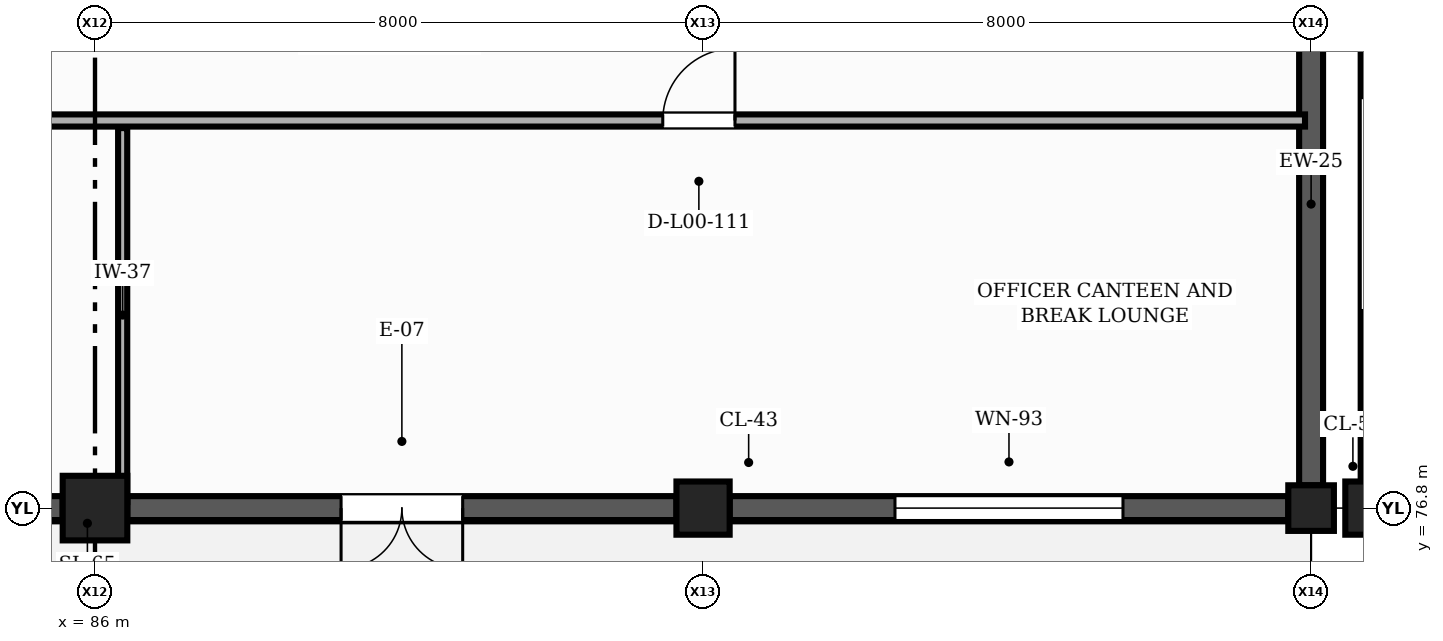
"""IFC4 building model, lengths in metres.
Left out: names, types, materials, properties, quantities, classifications, styles, units other than length and angle.
Written with IfcOpenShell. Run it as: python <this file> out.ifc"""

import sys

from ifc_helpers import new_model, si_unit, direction, frame, frame_2d, origin, origin_2d, place, context, subcontext, project, spatial, rectangle, extrude, element, fill, save


model = new_model("IFC4")
c1 = context("Model", 3, precision=1e-05, world=origin(), true_north=direction((0.0, 1.0)))
c2 = subcontext(c1, "Body", "Model", "MODEL_VIEW")
j1 = project(units=[si_unit("LENGTHUNIT", "METRE"), si_unit("PLANEANGLEUNIT", "RADIAN")], contexts=[c1])
p1 = place(None, origin())
s1 = spatial("IfcSite", under=j1, at=p1, CompositionType="ELEMENT")
p2 = place(p1, origin())
s2 = spatial("IfcBuilding", under=s1, at=p2, CompositionType="ELEMENT")
p3 = place(p2, origin())
s3 = spatial("IfcBuildingStorey", under=s2, at=p3, CompositionType="ELEMENT", Elevation=0.0)
p4 = place(p3, frame((86.0, 76.8, 0.0), z_axis=(0.0, 0.0, 1.0), x_axis=(1.0, 0.0, 0.0)))
e1 = element("IfcColumn", 1, at=p4, inside=s3, PredefinedType="COLUMN", context=c2, shape_type="SweptSolid", body=[
    extrude(rectangle(XDim=0.85, YDim=0.85, at=origin_2d()), origin(), (0.0, 0.0, 1.0), 4.8),
])
p5 = place(p3, frame((94.0, 76.8, 0.0), z_axis=(0.0, 0.0, 1.0), x_axis=(1.0, 0.0, 0.0)))
e2 = element("IfcColumn", 2, at=p5, inside=s3, PredefinedType="COLUMN", context=c2, shape_type="SweptSolid", body=[
    extrude(rectangle(XDim=0.7, YDim=0.7, at=origin_2d()), origin(), (0.0, 0.0, 1.0), 4.8),
])
p6 = place(p3, frame((102.0, 76.8, 0.0), z_axis=(0.0, 0.0, 1.0), x_axis=(1.0, 0.0, 0.0)))
e3 = element("IfcColumn", 3, at=p6, inside=s3, PredefinedType="COLUMN", context=c2, shape_type="SweptSolid", body=[
    extrude(rectangle(XDim=0.6, YDim=0.6, at=origin_2d()), origin(), (0.0, 0.0, 1.0), 4.8),
])
p7 = place(p3, frame((102.8, 76.8, 0.0), z_axis=(0.0, 0.0, 1.0), x_axis=(1.0, 0.0, 0.0)))
e4 = element("IfcColumn", 4, at=p7, inside=s3, PredefinedType="COLUMN", context=c2, shape_type="SweptSolid", body=[
    extrude(rectangle(XDim=0.7, YDim=0.7, at=origin_2d()), origin(), (0.0, 0.0, 1.0), 4.8),
])
p8 = place(p3, frame((78.425, 76.8, 0.0), z_axis=(0.0, 0.0, 1.0), x_axis=(1.0, 0.0, 0.0)))
e5 = element("IfcWall", 5, at=p8, inside=s3, PredefinedType="SOLIDWALL", context=c2, shape_type="SweptSolid", body=[
    extrude(rectangle(XDim=7.15, YDim=0.315, at=frame_2d((3.575, 0.0))), origin(), (0.0, 0.0, 1.0), 3.78),
])
p9 = place(p8, frame((1.975, 0.0, 0.9)))
e6 = element("IfcOpeningElement", 6, at=p9, cuts=e5, PredefinedType="OPENING", context=c2, shape_type="SweptSolid", body=[
    extrude(rectangle(XDim=3.2, YDim=2.0, at=frame_2d((1.6, 1.0))), frame((0.0, 0.167, 0.0), z_axis=(0.0, -1.0, 0.0), x_axis=(1.0, 0.0, 0.0)), (0.0, 0.0, 1.0), 0.335),
])
p10 = place(p3, frame((86.425, 76.8, 0.0), z_axis=(0.0, 0.0, 1.0), x_axis=(1.0, 0.0, 0.0)))
e7 = element("IfcWall", 7, at=p10, inside=s3, PredefinedType="SOLIDWALL", context=c2, shape_type="SweptSolid", body=[
    extrude(rectangle(XDim=7.225, YDim=0.315, at=frame_2d((3.612, 0.0))), origin(), (0.0, 0.0, 1.0), 3.78),
])
p11 = place(p10, frame((2.812, 0.0, 0.0)))
e8 = element("IfcOpeningElement", 8, at=p11, cuts=e7, PredefinedType="OPENING", context=c2, shape_type="SweptSolid", body=[
    extrude(rectangle(XDim=1.6, YDim=2.25, at=frame_2d((0.8, 1.125))), frame((0.0, 0.167, 0.0), z_axis=(0.0, -1.0, 0.0), x_axis=(1.0, 0.0, 0.0)), (0.0, 0.0, 1.0), 0.335),
])
p12 = place(p3, frame((94.35, 76.8, 0.0), z_axis=(0.0, 0.0, 1.0), x_axis=(1.0, 0.0, 0.0)))
e9 = element("IfcWall", 9, at=p12, inside=s3, PredefinedType="SOLIDWALL", context=c2, shape_type="SweptSolid", body=[
    extrude(rectangle(XDim=7.35, YDim=0.315, at=frame_2d((3.675, 0.0))), origin(), (0.0, 0.0, 1.0), 3.78),
])
p13 = place(p12, frame((2.175, 0.0, 0.9)))
e10 = element("IfcOpeningElement", 10, at=p13, cuts=e9, PredefinedType="OPENING", context=c2, shape_type="SweptSolid", body=[
    extrude(rectangle(XDim=3.0, YDim=1.8, at=frame_2d((1.5, 0.9))), frame((0.0, 0.167, 0.0), z_axis=(0.0, -1.0, 0.0), x_axis=(1.0, 0.0, 0.0)), (0.0, 0.0, 1.0), 0.335),
])
p14 = place(p3, frame((102.0, 77.1, 0.0), z_axis=(0.0, 0.0, 1.0), x_axis=(0.0, 1.0, 0.0)))
e11 = element("IfcWall", 11, at=p14, inside=s3, PredefinedType="SOLIDWALL", context=c2, shape_type="SweptSolid", body=[
    extrude(rectangle(XDim=7.4, YDim=0.315, at=frame_2d((3.7, 0.0))), origin(), (0.0, 0.0, 1.0), 3.88),
])
p15 = place(p3, frame((102.8, 84.45, -0.42), z_axis=(0.0, 0.0, 1.0), x_axis=(0.0, -1.0, 0.0)))
e12 = element("IfcWall", 12, at=p15, inside=s3, PredefinedType="SOLIDWALL", context=c2, shape_type="SweptSolid", body=[
    extrude(rectangle(XDim=7.3, YDim=0.295, at=frame_2d((3.65, 0.0))), origin(), (0.0, 0.0, 1.0), 4.3),
])
p16 = place(p15, frame((2.25, 0.0, 1.32)))
e13 = element("IfcOpeningElement", 13, at=p16, cuts=e12, PredefinedType="OPENING", context=c2, shape_type="SweptSolid", body=[
    extrude(rectangle(XDim=2.8, YDim=1.8, at=frame_2d((1.4, 0.9))), frame((0.0, 0.157, 0.0), z_axis=(0.0, -1.0, 0.0), x_axis=(1.0, 0.0, 0.0)), (0.0, 0.0, 1.0), 0.315),
])
p17 = place(p3, frame((86.364, 76.88, 0.0), z_axis=(0.0, 0.0, 1.0), x_axis=(0.0, 1.0, 0.0)))
e14 = element("IfcWall", 14, at=p17, inside=s3, PredefinedType="PARTITIONING", context=c2, shape_type="SweptSolid", body=[
    extrude(rectangle(XDim=4.92, YDim=0.12, at=frame_2d((2.46, 0.0))), origin(), (0.0, 0.0, 1.0), 4.53),
])
p18 = place(p3, frame((29.3, 81.9, 0.0), z_axis=(0.0, 0.0, 1.0), x_axis=(1.0, 0.0, 0.0)))
e15 = element("IfcWall", 15, at=p18, inside=s3, PredefinedType="PARTITIONING", context=c2, shape_type="SweptSolid", body=[
    extrude(rectangle(XDim=72.62, YDim=0.16, at=frame_2d((36.31, 0.0))), origin(), (0.0, 0.0, 1.0), 3.765),
])
p19 = place(p18, frame((7.68, 0.0, 0.0)))
e16 = element("IfcOpeningElement", 16, at=p19, cuts=e15, PredefinedType="OPENING", context=c2, shape_type="SweptSolid", body=[
    extrude(rectangle(XDim=1.08, YDim=2.14, at=frame_2d((0.54, 1.07))), frame((0.0, 0.09, 0.0), z_axis=(0.0, -1.0, 0.0), x_axis=(1.0, 0.0, 0.0)), (0.0, 0.0, 1.0), 0.18),
])
p20 = place(p18, frame((23.6, 0.0, 0.0)))
e17 = element("IfcOpeningElement", 17, at=p20, cuts=e15, PredefinedType="OPENING", context=c2, shape_type="SweptSolid", body=[
    extrude(rectangle(XDim=1.1, YDim=2.1, at=frame_2d((0.55, 1.05))), frame((0.0, 0.09, 0.0), z_axis=(0.0, -1.0, 0.0), x_axis=(1.0, 0.0, 0.0)), (0.0, 0.0, 1.0), 0.18),
])
p21 = place(p18, frame((36.75, 0.0, 0.0)))
e18 = element("IfcOpeningElement", 18, at=p21, cuts=e15, PredefinedType="OPENING", context=c2, shape_type="SweptSolid", body=[
    extrude(rectangle(XDim=0.9, YDim=2.1, at=frame_2d((0.45, 1.05))), frame((0.0, 0.09, 0.0), z_axis=(0.0, -1.0, 0.0), x_axis=(1.0, 0.0, 0.0)), (0.0, 0.0, 1.0), 0.18),
])
p22 = place(p18, frame((49.34, 0.0, 0.0)))
e19 = element("IfcOpeningElement", 19, at=p22, cuts=e15, PredefinedType="OPENING", context=c2, shape_type="SweptSolid", body=[
    extrude(rectangle(XDim=0.92, YDim=2.1, at=frame_2d((0.46, 1.05))), frame((0.0, 0.09, 0.0), z_axis=(0.0, -1.0, 0.0), x_axis=(1.0, 0.0, 0.0)), (0.0, 0.0, 1.0), 0.18),
])
p23 = place(p18, frame((64.17, 0.0, 0.0)))
e20 = element("IfcOpeningElement", 20, at=p23, cuts=e15, PredefinedType="OPENING", context=c2, shape_type="SweptSolid", body=[
    extrude(rectangle(XDim=0.95, YDim=2.1, at=frame_2d((0.475, 1.05))), frame((0.0, 0.09, 0.0), z_axis=(0.0, -1.0, 0.0), x_axis=(1.0, 0.0, 0.0)), (0.0, 0.0, 1.0), 0.18),
])
p24 = place(p11, frame((1.6, 0.0, 0.0), z_axis=(0.0, 0.0, 1.0), x_axis=(-1.0, 0.0, 0.0)))
e21 = element("IfcDoor", 21, at=p24, inside=s3, OperationType="DOUBLE_DOOR_SINGLE_SWING", PredefinedType="DOOR", context=c2, shape_type="SweptSolid", body=[
    extrude(rectangle(XDim=1.6, YDim=2.25, at=frame_2d((0.8, 1.125))), frame((0.0, 0.025, 0.0), z_axis=(0.0, -1.0, 0.0), x_axis=(1.0, 0.0, 0.0)), (0.0, 0.0, 1.0), 0.05),
])
fill(e8, e21)
p25 = place(p13, origin())
e22 = element("IfcWindow", 22, at=p25, inside=s3, PartitioningType="SINGLE_PANEL", PredefinedType="WINDOW", context=c2, shape_type="SweptSolid", body=[
    extrude(rectangle(XDim=3.0, YDim=1.8, at=frame_2d((1.5, 0.9))), frame((0.0, 0.03, 0.0), z_axis=(0.0, -1.0, 0.0), x_axis=(1.0, 0.0, 0.0)), (0.0, 0.0, 1.0), 0.06),
])
fill(e10, e22)
p26 = place(p23, origin())
e23 = element("IfcDoor", 23, at=p26, inside=s3, OperationType="SINGLE_SWING_RIGHT", PredefinedType="DOOR", context=c2, shape_type="SweptSolid", body=[
    extrude(rectangle(XDim=0.95, YDim=2.1, at=frame_2d((0.475, 1.05))), frame((0.0, 0.025, 0.0), z_axis=(0.0, -1.0, 0.0), x_axis=(1.0, 0.0, 0.0)), (0.0, 0.0, 1.0), 0.05),
])
fill(e20, e23)
save(model, sys.argv[1])
